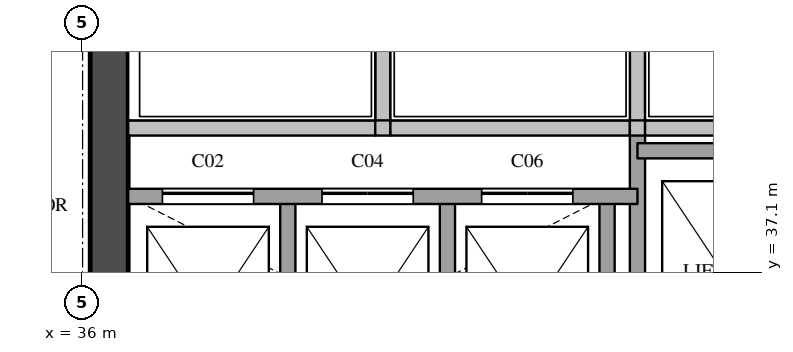
"""IFC4 building model, lengths in metres.
Left out: names, types, materials, properties, quantities, classifications, styles, units other than length and angle.
Written with IfcOpenShell. Run it as: python <this file> out.ifc"""

import sys

from ifc_helpers import new_model, si_unit, direction, frame, frame_2d, origin, place, context, subcontext, project, spatial, rectangle, extrude, element, fill, save


model = new_model("IFC4")
c1 = context("Model", 3, precision=1e-05, world=origin(), true_north=direction((0.0, 1.0)))
c2 = subcontext(c1, "Body", "Model", "MODEL_VIEW")
j1 = project(units=[si_unit("LENGTHUNIT", "METRE"), si_unit("PLANEANGLEUNIT", "RADIAN")], contexts=[c1])
p1 = place(None, origin())
s1 = spatial("IfcSite", under=j1, at=p1, CompositionType="ELEMENT")
p2 = place(p1, origin())
s2 = spatial("IfcBuilding", under=s1, at=p2, CompositionType="ELEMENT")
p3 = place(p2, frame((0.0, 0.0, 189.5)))
s3 = spatial("IfcBuildingStorey", under=s2, at=p3, CompositionType="ELEMENT", Elevation=189.5)
p4 = place(p3, frame((36.35, 29.1, 0.0), z_axis=(0.0, 0.0, 1.0), x_axis=(0.0, 1.0, 0.0)))
e1 = element("IfcWall", 1, at=p4, inside=s3, PredefinedType="SHEAR", context=c2, shape_type="SweptSolid", body=[
    extrude(rectangle(XDim=20.3, YDim=0.5, at=frame_2d((10.15, 0.0))), origin(), (0.0, 0.0, 1.0), 3.6),
])
p5 = place(p4, frame((3.6, 0.0, 0.0)))
e2 = element("IfcOpeningElement", 2, at=p5, cuts=e1, PredefinedType="OPENING", context=c2, shape_type="SweptSolid", body=[
    extrude(rectangle(XDim=1.8, YDim=2.1, at=frame_2d((0.9, 1.05))), frame((0.0, 0.26, 0.0), z_axis=(0.0, -1.0, 0.0), x_axis=(1.0, 0.0, 0.0)), (0.0, 0.0, 1.0), 0.52),
])
p6 = place(p4, frame((16.4, 0.0, 0.0)))
e3 = element("IfcOpeningElement", 3, at=p6, cuts=e1, PredefinedType="OPENING", context=c2, shape_type="SweptSolid", body=[
    extrude(rectangle(XDim=1.0, YDim=2.1, at=frame_2d((0.5, 1.05))), frame((0.0, 0.26, 0.0), z_axis=(0.0, -1.0, 0.0), x_axis=(1.0, 0.0, 0.0)), (0.0, 0.0, 1.0), 0.52),
])
p7 = place(p3, frame((38.7, 34.9, 0.0), z_axis=(0.0, 0.0, 1.0), x_axis=(0.0, 1.0, 0.0)))
e4 = element("IfcWall", 4, at=p7, inside=s3, PredefinedType="SOLIDWALL", context=c2, shape_type="SweptSolid", body=[
    extrude(rectangle(XDim=3.2, YDim=0.2, at=frame_2d((1.6, 0.0))), origin(), (0.0, 0.0, 1.0), 3.6),
])
p8 = place(p3, frame((39.95, 39.0, 0.0), z_axis=(0.0, 0.0, 1.0), x_axis=(0.0, 1.0, 0.0)))
e5 = element("IfcWall", 5, at=p8, inside=s3, PredefinedType="SOLIDWALL", context=c2, shape_type="SweptSolid", body=[
    extrude(rectangle(XDim=1.78, YDim=0.2, at=frame_2d((0.89, 0.0))), origin(), (0.0, 0.0, 1.0), 3.6),
])
for number, where, z_axis, x_axis in (
    (6, (40.8, 34.9, 0.0), (0.0, 0.0, 1.0), (0.0, 1.0, 0.0)),
    (7, (42.9, 34.9, 0.0), (0.0, 0.0, 1.0), (0.0, 1.0, 0.0)),
):
    element("IfcWall", number, at=place(p3, frame(where, z_axis=z_axis, x_axis=x_axis)), inside=s3, PredefinedType="SOLIDWALL", context=c2, shape_type="SweptSolid", body=[
        extrude(rectangle(XDim=3.2, YDim=0.2, at=frame_2d((1.6, 0.0))), origin(), (0.0, 0.0, 1.0), 3.6),
    ])
p9 = place(p3, frame((43.3, 29.1, 0.0), z_axis=(0.0, 0.0, 1.0), x_axis=(0.0, 1.0, 0.0)))
e8 = element("IfcWall", 8, at=p9, inside=s3, PredefinedType="SOLIDWALL", context=c2, shape_type="SweptSolid", body=[
    extrude(rectangle(XDim=9.9, YDim=0.2, at=frame_2d((4.95, 0.0))), origin(), (0.0, 0.0, 1.0), 3.6),
])
p10 = place(p3, frame((43.3, 39.0, 0.0), z_axis=(0.0, 0.0, 1.0), x_axis=(0.0, 1.0, 0.0)))
e9 = element("IfcWall", 9, at=p10, inside=s3, PredefinedType="SOLIDWALL", context=c2, shape_type="SweptSolid", body=[
    extrude(rectangle(XDim=1.78, YDim=0.2, at=frame_2d((0.89, 0.0))), origin(), (0.0, 0.0, 1.0), 3.6),
])
p11 = place(p3, frame((36.6, 38.1, 0.0), z_axis=(0.0, 0.0, 1.0), x_axis=(1.0, 0.0, 0.0)))
e10 = element("IfcWall", 10, at=p11, inside=s3, PredefinedType="SOLIDWALL", context=c2, shape_type="SweptSolid", body=[
    extrude(rectangle(XDim=6.7, YDim=0.2, at=frame_2d((3.35, 0.0))), origin(), (0.0, 0.0, 1.0), 3.6),
])
p12 = place(p11, frame((0.45, 0.0, 0.0)))
e11 = element("IfcOpeningElement", 11, at=p12, cuts=e10, PredefinedType="OPENING", context=c2, shape_type="SweptSolid", body=[
    extrude(rectangle(XDim=1.2, YDim=2.1, at=frame_2d((0.6, 1.05))), frame((0.0, 0.11, 0.0), z_axis=(0.0, -1.0, 0.0), x_axis=(1.0, 0.0, 0.0)), (0.0, 0.0, 1.0), 0.22),
])
p13 = place(p11, frame((2.55, 0.0, 0.0)))
e12 = element("IfcOpeningElement", 12, at=p13, cuts=e10, PredefinedType="OPENING", context=c2, shape_type="SweptSolid", body=[
    extrude(rectangle(XDim=1.2, YDim=2.1, at=frame_2d((0.6, 1.05))), frame((0.0, 0.11, 0.0), z_axis=(0.0, -1.0, 0.0), x_axis=(1.0, 0.0, 0.0)), (0.0, 0.0, 1.0), 0.22),
])
p14 = place(p11, frame((4.65, 0.0, 0.0)))
e13 = element("IfcOpeningElement", 13, at=p14, cuts=e10, PredefinedType="OPENING", context=c2, shape_type="SweptSolid", body=[
    extrude(rectangle(XDim=1.2, YDim=2.1, at=frame_2d((0.6, 1.05))), frame((0.0, 0.11, 0.0), z_axis=(0.0, -1.0, 0.0), x_axis=(1.0, 0.0, 0.0)), (0.0, 0.0, 1.0), 0.22),
])
p15 = place(p3, frame((43.3, 38.7, 0.0), z_axis=(0.0, 0.0, 1.0), x_axis=(1.0, 0.0, 0.0)))
e14 = element("IfcWall", 14, at=p15, inside=s3, PredefinedType="SOLIDWALL", context=c2, shape_type="SweptSolid", body=[
    extrude(rectangle(XDim=4.5, YDim=0.2, at=frame_2d((2.25, 0.0))), origin(), (0.0, 0.0, 1.0), 3.6),
])
p16 = place(p3, frame((36.6, 39.0, 0.0), z_axis=(0.0, 0.0, 1.0), x_axis=(1.0, 0.0, 0.0)))
e15 = element("IfcWall", 15, at=p16, inside=s3, PredefinedType="SOLIDWALL", context=c2, shape_type="SweptSolid", body=[
    extrude(rectangle(XDim=3.25, YDim=0.2, at=frame_2d((1.625, 0.0))), origin(), (0.0, 0.0, 1.0), 3.6),
])
p17 = place(p3, frame((39.85, 39.0, 0.0), z_axis=(0.0, 0.0, 1.0), x_axis=(1.0, 0.0, 0.0)))
e16 = element("IfcWall", 16, at=p17, inside=s3, PredefinedType="SOLIDWALL", context=c2, shape_type="SweptSolid", body=[
    extrude(rectangle(XDim=0.2, YDim=0.2, at=frame_2d((0.1, 0.0))), origin(), (0.0, 0.0, 1.0), 3.6),
])
p18 = place(p3, frame((40.05, 39.0, 0.0), z_axis=(0.0, 0.0, 1.0), x_axis=(1.0, 0.0, 0.0)))
e17 = element("IfcWall", 17, at=p18, inside=s3, PredefinedType="SOLIDWALL", context=c2, shape_type="SweptSolid", body=[
    extrude(rectangle(XDim=3.15, YDim=0.2, at=frame_2d((1.575, 0.0))), origin(), (0.0, 0.0, 1.0), 3.6),
])
p19 = place(p3, frame((43.2, 39.0, 0.0), z_axis=(0.0, 0.0, 1.0), x_axis=(1.0, 0.0, 0.0)))
e18 = element("IfcWall", 18, at=p19, inside=s3, PredefinedType="SOLIDWALL", context=c2, shape_type="SweptSolid", body=[
    extrude(rectangle(XDim=0.2, YDim=0.2, at=frame_2d((0.1, 0.0))), origin(), (0.0, 0.0, 1.0), 3.6),
])
p20 = place(p3, frame((43.4, 39.0, 0.0), z_axis=(0.0, 0.0, 1.0), x_axis=(1.0, 0.0, 0.0)))
e19 = element("IfcWall", 19, at=p20, inside=s3, PredefinedType="SOLIDWALL", context=c2, shape_type="SweptSolid", body=[
    extrude(rectangle(XDim=3.25, YDim=0.2, at=frame_2d((1.625, 0.0))), origin(), (0.0, 0.0, 1.0), 3.6),
])
p21 = place(p12, origin())
e20 = element("IfcDoor", 20, at=p21, inside=s3, OperationType="SLIDING_TO_LEFT", PredefinedType="DOOR", context=c2, shape_type="SweptSolid", body=[
    extrude(rectangle(XDim=1.2, YDim=2.1, at=frame_2d((0.6, 1.05))), frame((0.0, 0.025, 0.0), z_axis=(0.0, -1.0, 0.0), x_axis=(1.0, 0.0, 0.0)), (0.0, 0.0, 1.0), 0.05),
])
fill(e11, e20)
p22 = place(p13, origin())
e21 = element("IfcDoor", 21, at=p22, inside=s3, OperationType="SLIDING_TO_LEFT", PredefinedType="DOOR", context=c2, shape_type="SweptSolid", body=[
    extrude(rectangle(XDim=1.2, YDim=2.1, at=frame_2d((0.6, 1.05))), frame((0.0, 0.025, 0.0), z_axis=(0.0, -1.0, 0.0), x_axis=(1.0, 0.0, 0.0)), (0.0, 0.0, 1.0), 0.05),
])
fill(e12, e21)
p23 = place(p14, origin())
e22 = element("IfcDoor", 22, at=p23, inside=s3, OperationType="SLIDING_TO_LEFT", PredefinedType="DOOR", context=c2, shape_type="SweptSolid", body=[
    extrude(rectangle(XDim=1.2, YDim=2.1, at=frame_2d((0.6, 1.05))), frame((0.0, 0.025, 0.0), z_axis=(0.0, -1.0, 0.0), x_axis=(1.0, 0.0, 0.0)), (0.0, 0.0, 1.0), 0.05),
])
fill(e13, e22)
save(model, sys.argv[1])
